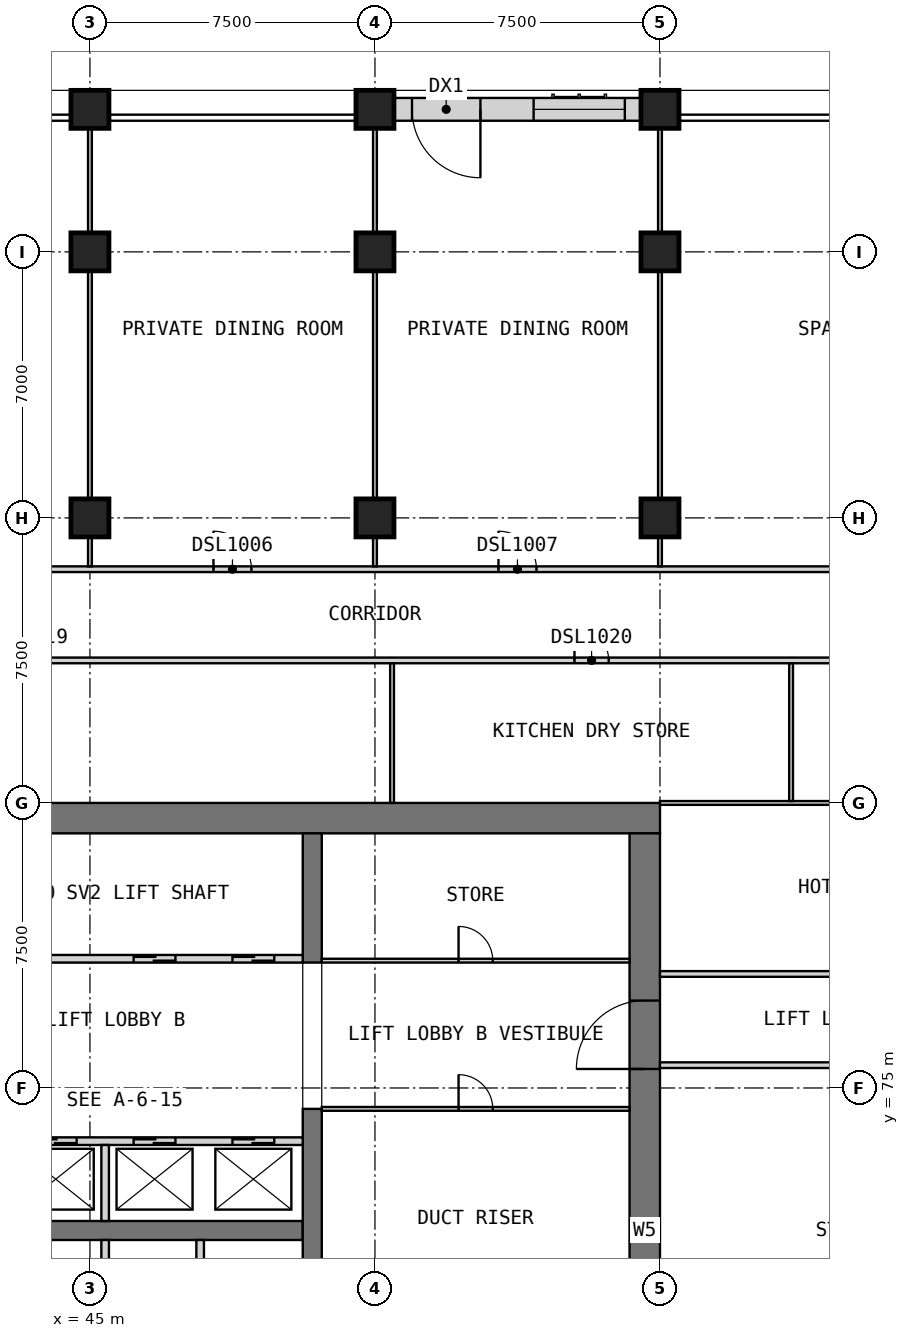
"""IFC4 building model, lengths in metres.
Left out: names, types, materials, properties, quantities, classifications, styles, units other than length and angle.
Written with IfcOpenShell. Run it as: python <this file> out.ifc"""

import sys

from ifc_helpers import new_model, si_unit, direction, frame, frame_2d, origin, origin_2d, place, context, subcontext, project, spatial, rectangle, extrude, element, fill, save


model = new_model("IFC4")
c1 = context("Model", 3, precision=1e-05, world=origin(), true_north=direction((0.0, 1.0)))
c2 = subcontext(c1, "Body", "Model", "MODEL_VIEW")
j1 = project(units=[si_unit("LENGTHUNIT", "METRE"), si_unit("PLANEANGLEUNIT", "RADIAN")], contexts=[c1])
p1 = place(None, origin())
s1 = spatial("IfcSite", under=j1, at=p1, CompositionType="ELEMENT")
p2 = place(p1, origin())
s2 = spatial("IfcBuilding", under=s1, at=p2, CompositionType="ELEMENT")
p3 = place(p2, frame((0.0, 0.0, 124.2)))
s3 = spatial("IfcBuildingStorey", under=s2, at=p3, CompositionType="ELEMENT", Elevation=124.2)
for number, where, z_axis, x_axis in (
    (1, (45.0, 100.75, 0.0), (0.0, 0.0, 1.0), (1.0, 0.0, 0.0)),
    (2, (52.5, 100.75, 0.0), (0.0, 0.0, 1.0), (1.0, 0.0, 0.0)),
    (3, (60.0, 100.75, 0.0), (0.0, 0.0, 1.0), (1.0, 0.0, 0.0)),
    (4, (45.0, 90.0, 0.0), (0.0, 0.0, 1.0), (1.0, 0.0, 0.0)),
    (5, (45.0, 97.0, 0.0), (0.0, 0.0, 1.0), (1.0, 0.0, 0.0)),
    (6, (52.5, 90.0, 0.0), (0.0, 0.0, 1.0), (1.0, 0.0, 0.0)),
    (7, (52.5, 97.0, 0.0), (0.0, 0.0, 1.0), (1.0, 0.0, 0.0)),
    (8, (60.0, 90.0, 0.0), (0.0, 0.0, 1.0), (1.0, 0.0, 0.0)),
    (9, (60.0, 97.0, 0.0), (0.0, 0.0, 1.0), (1.0, 0.0, 0.0)),
):
    element("IfcColumn", number, at=place(p3, frame(where, z_axis=z_axis, x_axis=x_axis)), inside=s3, PredefinedType="COLUMN", context=c2, shape_type="SweptSolid", body=[
        extrude(rectangle(XDim=1.0, YDim=1.0, at=origin_2d()), origin(), (0.0, 0.0, 1.0), 6.0),
    ])
p4 = place(p3, frame((30.0, 82.1, 0.0), z_axis=(0.0, 0.0, 1.0), x_axis=(1.0, 0.0, 0.0)))
e10 = element("IfcWall", 10, at=p4, inside=s3, PredefinedType="SHEAR", context=c2, shape_type="SweptSolid", body=[
    extrude(rectangle(XDim=30.0, YDim=0.8, at=frame_2d((15.0, 0.0))), origin(), (0.0, 0.0, 1.0), 6.0),
])
p5 = place(p3, frame((59.6, 60.8, 0.0), z_axis=(0.0, 0.0, 1.0), x_axis=(0.0, 1.0, 0.0)))
e11 = element("IfcWall", 11, at=p5, inside=s3, PredefinedType="SHEAR", context=c2, shape_type="SweptSolid", body=[
    extrude(rectangle(XDim=20.9, YDim=0.8, at=frame_2d((10.45, 0.0))), origin(), (0.0, 0.0, 1.0), 6.0),
])
p6 = place(p5, frame((14.7, 0.0, 0.0)))
e12 = element("IfcOpeningElement", 12, at=p6, cuts=e11, PredefinedType="OPENING", context=c2, shape_type="SweptSolid", body=[
    extrude(rectangle(XDim=1.8, YDim=2.1, at=frame_2d((0.9, 1.05))), frame((0.0, 0.41, 0.0), z_axis=(0.0, -1.0, 0.0), x_axis=(1.0, 0.0, 0.0)), (0.0, 0.0, 1.0), 0.82),
])
p7 = place(p3, frame((35.0, 71.25, 0.0), z_axis=(0.0, 0.0, 1.0), x_axis=(1.0, 0.0, 0.0)))
e13 = element("IfcWall", 13, at=p7, inside=s3, PredefinedType="SHEAR", context=c2, shape_type="SweptSolid", body=[
    extrude(rectangle(XDim=15.6, YDim=0.5, at=frame_2d((7.8, 0.0))), origin(), (0.0, 0.0, 1.0), 6.0),
])
p8 = place(p3, frame((50.85, 68.05, 0.0), z_axis=(0.0, 0.0, 1.0), x_axis=(0.0, 1.0, 0.0)))
e14 = element("IfcWall", 14, at=p8, inside=s3, PredefinedType="SHEAR", context=c2, shape_type="SweptSolid", body=[
    extrude(rectangle(XDim=6.4, YDim=0.5, at=frame_2d((3.2, 0.0))), origin(), (0.0, 0.0, 1.0), 6.0),
])
p9 = place(p3, frame((50.85, 78.3, 0.0), z_axis=(0.0, 0.0, 1.0), x_axis=(0.0, 1.0, 0.0)))
e15 = element("IfcWall", 15, at=p9, inside=s3, PredefinedType="SHEAR", context=c2, shape_type="SweptSolid", body=[
    extrude(rectangle(XDim=3.4, YDim=0.5, at=frame_2d((1.7, 0.0))), origin(), (0.0, 0.0, 1.0), 6.0),
])
p10 = place(p3, frame((59.5, 100.75, 0.0), z_axis=(0.0, 0.0, 1.0), x_axis=(-1.0, 0.0, 0.0)))
e16 = element("IfcWall", 16, at=p10, inside=s3, PredefinedType="SOLIDWALL", context=c2, shape_type="SweptSolid", body=[
    extrude(rectangle(XDim=6.5, YDim=0.6, at=frame_2d((3.25, 0.0))), origin(), (0.0, 0.0, 1.0), 5.25),
])
p11 = place(p10, frame((4.225, 0.0, 0.0)))
e17 = element("IfcOpeningElement", 17, at=p11, cuts=e16, PredefinedType="OPENING", context=c2, shape_type="SweptSolid", body=[
    extrude(rectangle(XDim=1.8, YDim=2.4, at=frame_2d((0.9, 1.2))), frame((0.0, 0.31, 0.0), z_axis=(0.0, -1.0, 0.0), x_axis=(1.0, 0.0, 0.0)), (0.0, 0.0, 1.0), 0.62),
])
p12 = place(p10, frame((0.425, 0.0, 0.8)))
e18 = element("IfcOpeningElement", 18, at=p12, cuts=e16, PredefinedType="OPENING", context=c2, shape_type="SweptSolid", body=[
    extrude(rectangle(XDim=2.4, YDim=1.8, at=frame_2d((1.2, 0.9))), frame((0.0, 0.31, 0.0), z_axis=(0.0, -1.0, 0.0), x_axis=(1.0, 0.0, 0.0)), (0.0, 0.0, 1.0), 0.62),
])
for number, where, z_axis, x_axis in (
    (19, (45.4, 68.25, 0.0), (0.0, 0.0, 1.0), (0.0, 1.0, 0.0)),
    (20, (47.9, 68.25, 0.0), (0.0, 0.0, 1.0), (0.0, 1.0, 0.0)),
):
    element("IfcWall", number, at=place(p3, frame(where, z_axis=z_axis, x_axis=x_axis)), inside=s3, PredefinedType="SOLIDWALL", context=c2, shape_type="SweptSolid", body=[
        extrude(rectangle(XDim=2.75, YDim=0.2, at=frame_2d((1.375, 0.0))), origin(), (0.0, 0.0, 1.0), 6.0),
    ])
p13 = place(p3, frame((35.0, 73.6, 0.0), z_axis=(0.0, 0.0, 1.0), x_axis=(1.0, 0.0, 0.0)))
e21 = element("IfcWall", 21, at=p13, inside=s3, PredefinedType="SOLIDWALL", context=c2, shape_type="SweptSolid", body=[
    extrude(rectangle(XDim=15.6, YDim=0.2, at=frame_2d((7.8, 0.0))), origin(), (0.0, 0.0, 1.0), 6.0),
])
p14 = place(p13, frame((0.75, 0.0, 0.0)))
e22 = element("IfcOpeningElement", 22, at=p14, cuts=e21, PredefinedType="OPENING", context=c2, shape_type="SweptSolid", body=[
    extrude(rectangle(XDim=1.1, YDim=2.1, at=frame_2d((0.55, 1.05))), frame((0.0, 0.11, 0.0), z_axis=(0.0, -1.0, 0.0), x_axis=(1.0, 0.0, 0.0)), (0.0, 0.0, 1.0), 0.22),
])
p15 = place(p13, frame((3.35, 0.0, 0.0)))
e23 = element("IfcOpeningElement", 23, at=p15, cuts=e21, PredefinedType="OPENING", context=c2, shape_type="SweptSolid", body=[
    extrude(rectangle(XDim=1.1, YDim=2.1, at=frame_2d((0.55, 1.05))), frame((0.0, 0.11, 0.0), z_axis=(0.0, -1.0, 0.0), x_axis=(1.0, 0.0, 0.0)), (0.0, 0.0, 1.0), 0.22),
])
p16 = place(p13, frame((5.95, 0.0, 0.0)))
e24 = element("IfcOpeningElement", 24, at=p16, cuts=e21, PredefinedType="OPENING", context=c2, shape_type="SweptSolid", body=[
    extrude(rectangle(XDim=1.1, YDim=2.1, at=frame_2d((0.55, 1.05))), frame((0.0, 0.11, 0.0), z_axis=(0.0, -1.0, 0.0), x_axis=(1.0, 0.0, 0.0)), (0.0, 0.0, 1.0), 0.22),
])
p17 = place(p13, frame((8.55, 0.0, 0.0)))
e25 = element("IfcOpeningElement", 25, at=p17, cuts=e21, PredefinedType="OPENING", context=c2, shape_type="SweptSolid", body=[
    extrude(rectangle(XDim=1.1, YDim=2.1, at=frame_2d((0.55, 1.05))), frame((0.0, 0.11, 0.0), z_axis=(0.0, -1.0, 0.0), x_axis=(1.0, 0.0, 0.0)), (0.0, 0.0, 1.0), 0.22),
])
p18 = place(p13, frame((11.15, 0.0, 0.0)))
e26 = element("IfcOpeningElement", 26, at=p18, cuts=e21, PredefinedType="OPENING", context=c2, shape_type="SweptSolid", body=[
    extrude(rectangle(XDim=1.1, YDim=2.1, at=frame_2d((0.55, 1.05))), frame((0.0, 0.11, 0.0), z_axis=(0.0, -1.0, 0.0), x_axis=(1.0, 0.0, 0.0)), (0.0, 0.0, 1.0), 0.22),
])
p19 = place(p13, frame((13.75, 0.0, 0.0)))
e27 = element("IfcOpeningElement", 27, at=p19, cuts=e21, PredefinedType="OPENING", context=c2, shape_type="SweptSolid", body=[
    extrude(rectangle(XDim=1.1, YDim=2.1, at=frame_2d((0.55, 1.05))), frame((0.0, 0.11, 0.0), z_axis=(0.0, -1.0, 0.0), x_axis=(1.0, 0.0, 0.0)), (0.0, 0.0, 1.0), 0.22),
])
p20 = place(p3, frame((45.4, 71.5, 0.0), z_axis=(0.0, 0.0, 1.0), x_axis=(0.0, 1.0, 0.0)))
e28 = element("IfcWall", 28, at=p20, inside=s3, PredefinedType="SOLIDWALL", context=c2, shape_type="SweptSolid", body=[
    extrude(rectangle(XDim=2.0, YDim=0.2, at=frame_2d((1.0, 0.0))), origin(), (0.0, 0.0, 1.0), 6.0),
])
p21 = place(p3, frame((35.0, 78.4, 0.0), z_axis=(0.0, 0.0, 1.0), x_axis=(1.0, 0.0, 0.0)))
e29 = element("IfcWall", 29, at=p21, inside=s3, PredefinedType="SOLIDWALL", context=c2, shape_type="SweptSolid", body=[
    extrude(rectangle(XDim=15.6, YDim=0.2, at=frame_2d((7.8, 0.0))), origin(), (0.0, 0.0, 1.0), 6.0),
])
p22 = place(p21, frame((0.75, 0.0, 0.0)))
e30 = element("IfcOpeningElement", 30, at=p22, cuts=e29, PredefinedType="OPENING", context=c2, shape_type="SweptSolid", body=[
    extrude(rectangle(XDim=1.1, YDim=2.1, at=frame_2d((0.55, 1.05))), frame((0.0, 0.11, 0.0), z_axis=(0.0, -1.0, 0.0), x_axis=(1.0, 0.0, 0.0)), (0.0, 0.0, 1.0), 0.22),
])
p23 = place(p21, frame((3.35, 0.0, 0.0)))
e31 = element("IfcOpeningElement", 31, at=p23, cuts=e29, PredefinedType="OPENING", context=c2, shape_type="SweptSolid", body=[
    extrude(rectangle(XDim=1.1, YDim=2.1, at=frame_2d((0.55, 1.05))), frame((0.0, 0.11, 0.0), z_axis=(0.0, -1.0, 0.0), x_axis=(1.0, 0.0, 0.0)), (0.0, 0.0, 1.0), 0.22),
])
p24 = place(p21, frame((11.15, 0.0, 0.0)))
e32 = element("IfcOpeningElement", 32, at=p24, cuts=e29, PredefinedType="OPENING", context=c2, shape_type="SweptSolid", body=[
    extrude(rectangle(XDim=1.1, YDim=2.1, at=frame_2d((0.55, 1.05))), frame((0.0, 0.11, 0.0), z_axis=(0.0, -1.0, 0.0), x_axis=(1.0, 0.0, 0.0)), (0.0, 0.0, 1.0), 0.22),
])
p25 = place(p21, frame((13.75, 0.0, 0.0)))
e33 = element("IfcOpeningElement", 33, at=p25, cuts=e29, PredefinedType="OPENING", context=c2, shape_type="SweptSolid", body=[
    extrude(rectangle(XDim=1.1, YDim=2.1, at=frame_2d((0.55, 1.05))), frame((0.0, 0.11, 0.0), z_axis=(0.0, -1.0, 0.0), x_axis=(1.0, 0.0, 0.0)), (0.0, 0.0, 1.0), 0.22),
])
p26 = place(p3, frame((51.1, 74.45, 0.0), z_axis=(0.0, 0.0, 1.0), x_axis=(1.0, 0.0, 0.0)))
e34 = element("IfcWall", 34, at=p26, inside=s3, PredefinedType="PARTITIONING", context=c2, shape_type="SweptSolid", body=[
    extrude(rectangle(XDim=8.1, YDim=0.1, at=frame_2d((4.05, 0.0))), origin(), (0.0, 0.0, 1.0), 5.75),
])
p27 = place(p26, frame((3.6, 0.0, 0.0)))
e35 = element("IfcOpeningElement", 35, at=p27, cuts=e34, PredefinedType="OPENING", context=c2, shape_type="SweptSolid", body=[
    extrude(rectangle(XDim=0.9, YDim=2.1, at=frame_2d((0.45, 1.05))), frame((0.0, 0.06, 0.0), z_axis=(0.0, -1.0, 0.0), x_axis=(1.0, 0.0, 0.0)), (0.0, 0.0, 1.0), 0.12),
])
p28 = place(p3, frame((51.1, 78.35, 0.0), z_axis=(0.0, 0.0, 1.0), x_axis=(1.0, 0.0, 0.0)))
e36 = element("IfcWall", 36, at=p28, inside=s3, PredefinedType="PARTITIONING", context=c2, shape_type="SweptSolid", body=[
    extrude(rectangle(XDim=8.1, YDim=0.1, at=frame_2d((4.05, 0.0))), origin(), (0.0, 0.0, 1.0), 5.75),
])
p29 = place(p28, frame((3.6, 0.0, 0.0)))
e37 = element("IfcOpeningElement", 37, at=p29, cuts=e36, PredefinedType="OPENING", context=c2, shape_type="SweptSolid", body=[
    extrude(rectangle(XDim=0.9, YDim=2.1, at=frame_2d((0.45, 1.05))), frame((0.0, 0.06, 0.0), z_axis=(0.0, -1.0, 0.0), x_axis=(1.0, 0.0, 0.0)), (0.0, 0.0, 1.0), 0.12),
])
p30 = place(p3, frame((33.75, 86.25, 0.0), z_axis=(0.0, 0.0, 1.0), x_axis=(1.0, 0.0, 0.0)))
e38 = element("IfcWall", 38, at=p30, inside=s3, PredefinedType="PARTITIONING", context=c2, shape_type="SweptSolid", body=[
    extrude(rectangle(XDim=37.5, YDim=0.15, at=frame_2d((18.75, 0.0))), origin(), (0.0, 0.0, 1.0), 5.75),
])
p31 = place(p30, frame((9.15, 0.0, 0.0)))
e39 = element("IfcOpeningElement", 39, at=p31, cuts=e38, PredefinedType="OPENING", context=c2, shape_type="SweptSolid", body=[
    extrude(rectangle(XDim=0.9, YDim=2.1, at=frame_2d((0.45, 1.05))), frame((0.0, 0.085, 0.0), z_axis=(0.0, -1.0, 0.0), x_axis=(1.0, 0.0, 0.0)), (0.0, 0.0, 1.0), 0.17),
])
p32 = place(p30, frame((24.0, 0.0, 0.0)))
e40 = element("IfcOpeningElement", 40, at=p32, cuts=e38, PredefinedType="OPENING", context=c2, shape_type="SweptSolid", body=[
    extrude(rectangle(XDim=0.9, YDim=2.1, at=frame_2d((0.45, 1.05))), frame((0.0, 0.085, 0.0), z_axis=(0.0, -1.0, 0.0), x_axis=(1.0, 0.0, 0.0)), (0.0, 0.0, 1.0), 0.17),
])
p33 = place(p3, frame((33.75, 88.65, 0.0), z_axis=(0.0, 0.0, 1.0), x_axis=(1.0, 0.0, 0.0)))
e41 = element("IfcWall", 41, at=p33, inside=s3, PredefinedType="PARTITIONING", context=c2, shape_type="SweptSolid", body=[
    extrude(rectangle(XDim=39.9, YDim=0.15, at=frame_2d((19.95, 0.0))), origin(), (0.0, 0.0, 1.0), 5.75),
])
p34 = place(p33, frame((4.725, 0.0, 0.0)))
e42 = element("IfcOpeningElement", 42, at=p34, cuts=e41, PredefinedType="OPENING", context=c2, shape_type="SweptSolid", body=[
    extrude(rectangle(XDim=1.8, YDim=2.1, at=frame_2d((0.9, 1.05))), frame((0.0, 0.085, 0.0), z_axis=(0.0, -1.0, 0.0), x_axis=(1.0, 0.0, 0.0)), (0.0, 0.0, 1.0), 0.17),
])
p35 = place(p33, frame((14.5, 0.0, 0.0)))
e43 = element("IfcOpeningElement", 43, at=p35, cuts=e41, PredefinedType="OPENING", context=c2, shape_type="SweptSolid", body=[
    extrude(rectangle(XDim=1.0, YDim=2.1, at=frame_2d((0.5, 1.05))), frame((0.0, 0.085, 0.0), z_axis=(0.0, -1.0, 0.0), x_axis=(1.0, 0.0, 0.0)), (0.0, 0.0, 1.0), 0.17),
])
p36 = place(p33, frame((22.0, 0.0, 0.0)))
e44 = element("IfcOpeningElement", 44, at=p36, cuts=e41, PredefinedType="OPENING", context=c2, shape_type="SweptSolid", body=[
    extrude(rectangle(XDim=1.0, YDim=2.1, at=frame_2d((0.5, 1.05))), frame((0.0, 0.085, 0.0), z_axis=(0.0, -1.0, 0.0), x_axis=(1.0, 0.0, 0.0)), (0.0, 0.0, 1.0), 0.17),
])
p37 = place(p33, frame((31.375, 0.0, 0.0)))
e45 = element("IfcOpeningElement", 45, at=p37, cuts=e41, PredefinedType="OPENING", context=c2, shape_type="SweptSolid", body=[
    extrude(rectangle(XDim=1.0, YDim=2.1, at=frame_2d((0.5, 1.05))), frame((0.0, 0.085, 0.0), z_axis=(0.0, -1.0, 0.0), x_axis=(1.0, 0.0, 0.0)), (0.0, 0.0, 1.0), 0.17),
])
p38 = place(p3, frame((60.0, 82.5, 0.0), z_axis=(0.0, 0.0, 1.0), x_axis=(1.0, 0.0, 0.0)))
e46 = element("IfcWall", 46, at=p38, inside=s3, PredefinedType="PARTITIONING", context=c2, shape_type="SweptSolid", body=[
    extrude(rectangle(XDim=11.175, YDim=0.1, at=frame_2d((5.587, 0.0))), origin(), (0.0, 0.0, 1.0), 5.75),
])
for number, where, z_axis, x_axis in (
    (47, (45.0, 88.725, 0.0), (0.0, 0.0, 1.0), (0.0, 1.0, 0.0)),
    (48, (52.5, 88.725, 0.0), (0.0, 0.0, 1.0), (0.0, 1.0, 0.0)),
):
    element("IfcWall", number, at=place(p3, frame(where, z_axis=z_axis, x_axis=x_axis)), inside=s3, PredefinedType="PARTITIONING", context=c2, shape_type="SweptSolid", body=[
        extrude(rectangle(XDim=12.525, YDim=0.1, at=frame_2d((6.262, 0.0))), origin(), (0.0, 0.0, 1.0), 5.75),
    ])
p39 = place(p3, frame((52.95, 82.5, 0.0), z_axis=(0.0, 0.0, 1.0), x_axis=(0.0, 1.0, 0.0)))
e49 = element("IfcWall", 49, at=p39, inside=s3, PredefinedType="PARTITIONING", context=c2, shape_type="SweptSolid", body=[
    extrude(rectangle(XDim=3.675, YDim=0.1, at=frame_2d((1.837, 0.0))), origin(), (0.0, 0.0, 1.0), 5.75),
])
p40 = place(p3, frame((60.0, 88.725, 0.0), z_axis=(0.0, 0.0, 1.0), x_axis=(0.0, 1.0, 0.0)))
e50 = element("IfcWall", 50, at=p40, inside=s3, PredefinedType="PARTITIONING", context=c2, shape_type="SweptSolid", body=[
    extrude(rectangle(XDim=12.525, YDim=0.1, at=frame_2d((6.262, 0.0))), origin(), (0.0, 0.0, 1.0), 5.75),
])
p41 = place(p3, frame((63.45, 82.55, 0.0), z_axis=(0.0, 0.0, 1.0), x_axis=(0.0, 1.0, 0.0)))
e51 = element("IfcWall", 51, at=p41, inside=s3, PredefinedType="PARTITIONING", context=c2, shape_type="SweptSolid", body=[
    extrude(rectangle(XDim=3.625, YDim=0.1, at=frame_2d((1.812, 0.0))), origin(), (0.0, 0.0, 1.0), 5.75),
])
for number, where, z_axis, x_axis in (
    (52, (60.0, 75.6, 0.0), (0.0, 0.0, 1.0), (1.0, 0.0, 0.0)),
    (53, (60.0, 78.0, 0.0), (0.0, 0.0, 1.0), (1.0, 0.0, 0.0)),
):
    element("IfcWall", number, at=place(p3, frame(where, z_axis=z_axis, x_axis=x_axis)), inside=s3, PredefinedType="PARTITIONING", context=c2, shape_type="SweptSolid", body=[
        extrude(rectangle(XDim=11.25, YDim=0.15, at=frame_2d((5.625, 0.0))), origin(), (0.0, 0.0, 1.0), 5.75),
    ])
p42 = place(p11, origin())
e54 = element("IfcDoor", 54, at=p42, inside=s3, OperationType="SINGLE_SWING_LEFT", PredefinedType="DOOR", context=c2, shape_type="SweptSolid", body=[
    extrude(rectangle(XDim=1.8, YDim=2.4, at=frame_2d((0.9, 1.2))), frame((0.0, -0.075, 0.0), z_axis=(0.0, -1.0, 0.0), x_axis=(1.0, 0.0, 0.0)), (0.0, 0.0, 1.0), 0.05),
])
fill(e17, e54)
p43 = place(p12, origin())
e55 = element("IfcWindow", 55, at=p43, inside=s3, PartitioningType="SINGLE_PANEL", PredefinedType="WINDOW", context=c2, shape_type="SweptSolid", body=[
    extrude(rectangle(XDim=2.4, YDim=1.8, at=frame_2d((1.2, 0.9))), frame((0.0, -0.07, 0.0), z_axis=(0.0, -1.0, 0.0), x_axis=(1.0, 0.0, 0.0)), (0.0, 0.0, 1.0), 0.06),
])
fill(e18, e55)
p44 = place(p17, origin())
e56 = element("IfcDoor", 56, at=p44, inside=s3, OperationType="DOUBLE_DOOR_SLIDING", PredefinedType="DOOR", context=c2, shape_type="SweptSolid", body=[
    extrude(rectangle(XDim=1.1, YDim=2.1, at=frame_2d((0.55, 1.05))), frame((0.0, 0.025, 0.0), z_axis=(0.0, -1.0, 0.0), x_axis=(1.0, 0.0, 0.0)), (0.0, 0.0, 1.0), 0.05),
])
fill(e25, e56)
p45 = place(p18, origin())
e57 = element("IfcDoor", 57, at=p45, inside=s3, OperationType="DOUBLE_DOOR_SLIDING", PredefinedType="DOOR", context=c2, shape_type="SweptSolid", body=[
    extrude(rectangle(XDim=1.1, YDim=2.1, at=frame_2d((0.55, 1.05))), frame((0.0, 0.025, 0.0), z_axis=(0.0, -1.0, 0.0), x_axis=(1.0, 0.0, 0.0)), (0.0, 0.0, 1.0), 0.05),
])
fill(e26, e57)
p46 = place(p19, origin())
e58 = element("IfcDoor", 58, at=p46, inside=s3, OperationType="DOUBLE_DOOR_SLIDING", PredefinedType="DOOR", context=c2, shape_type="SweptSolid", body=[
    extrude(rectangle(XDim=1.1, YDim=2.1, at=frame_2d((0.55, 1.05))), frame((0.0, 0.025, 0.0), z_axis=(0.0, -1.0, 0.0), x_axis=(1.0, 0.0, 0.0)), (0.0, 0.0, 1.0), 0.05),
])
fill(e27, e58)
p47 = place(p24, origin())
e59 = element("IfcDoor", 59, at=p47, inside=s3, OperationType="DOUBLE_DOOR_SLIDING", PredefinedType="DOOR", context=c2, shape_type="SweptSolid", body=[
    extrude(rectangle(XDim=1.1, YDim=2.1, at=frame_2d((0.55, 1.05))), frame((0.0, 0.025, 0.0), z_axis=(0.0, -1.0, 0.0), x_axis=(1.0, 0.0, 0.0)), (0.0, 0.0, 1.0), 0.05),
])
fill(e32, e59)
p48 = place(p25, origin())
e60 = element("IfcDoor", 60, at=p48, inside=s3, OperationType="DOUBLE_DOOR_SLIDING", PredefinedType="DOOR", context=c2, shape_type="SweptSolid", body=[
    extrude(rectangle(XDim=1.1, YDim=2.1, at=frame_2d((0.55, 1.05))), frame((0.0, 0.025, 0.0), z_axis=(0.0, -1.0, 0.0), x_axis=(1.0, 0.0, 0.0)), (0.0, 0.0, 1.0), 0.05),
])
fill(e33, e60)
p49 = place(p6, origin())
e61 = element("IfcDoor", 61, at=p49, inside=s3, OperationType="DOUBLE_DOOR_SINGLE_SWING", PredefinedType="DOOR", context=c2, shape_type="SweptSolid", body=[
    extrude(rectangle(XDim=1.8, YDim=2.1, at=frame_2d((0.9, 1.05))), frame((0.0, 0.025, 0.0), z_axis=(0.0, -1.0, 0.0), x_axis=(1.0, 0.0, 0.0)), (0.0, 0.0, 1.0), 0.05),
])
fill(e12, e61)
p50 = place(p27, origin())
e62 = element("IfcDoor", 62, at=p50, inside=s3, OperationType="SINGLE_SWING_RIGHT", PredefinedType="DOOR", context=c2, shape_type="SweptSolid", body=[
    extrude(rectangle(XDim=0.9, YDim=2.1, at=frame_2d((0.45, 1.05))), frame((0.0, 0.025, 0.0), z_axis=(0.0, -1.0, 0.0), x_axis=(1.0, 0.0, 0.0)), (0.0, 0.0, 1.0), 0.05),
])
fill(e35, e62)
p51 = place(p29, origin())
e63 = element("IfcDoor", 63, at=p51, inside=s3, OperationType="SINGLE_SWING_RIGHT", PredefinedType="DOOR", context=c2, shape_type="SweptSolid", body=[
    extrude(rectangle(XDim=0.9, YDim=2.1, at=frame_2d((0.45, 1.05))), frame((0.0, 0.025, 0.0), z_axis=(0.0, -1.0, 0.0), x_axis=(1.0, 0.0, 0.0)), (0.0, 0.0, 1.0), 0.05),
])
fill(e37, e63)
p52 = place(p35, origin())
e64 = element("IfcDoor", 64, at=p52, inside=s3, OperationType="SINGLE_SWING_LEFT", PredefinedType="DOOR", context=c2, shape_type="SweptSolid", body=[
    extrude(rectangle(XDim=1.0, YDim=2.1, at=frame_2d((0.5, 1.05))), frame((0.0, 0.025, 0.0), z_axis=(0.0, -1.0, 0.0), x_axis=(1.0, 0.0, 0.0)), (0.0, 0.0, 1.0), 0.05),
])
fill(e43, e64)
p53 = place(p36, origin())
e65 = element("IfcDoor", 65, at=p53, inside=s3, OperationType="SINGLE_SWING_LEFT", PredefinedType="DOOR", context=c2, shape_type="SweptSolid", body=[
    extrude(rectangle(XDim=1.0, YDim=2.1, at=frame_2d((0.5, 1.05))), frame((0.0, 0.025, 0.0), z_axis=(0.0, -1.0, 0.0), x_axis=(1.0, 0.0, 0.0)), (0.0, 0.0, 1.0), 0.05),
])
fill(e44, e65)
p54 = place(p32, origin())
e66 = element("IfcDoor", 66, at=p54, inside=s3, OperationType="SINGLE_SWING_LEFT", PredefinedType="DOOR", context=c2, shape_type="SweptSolid", body=[
    extrude(rectangle(XDim=0.9, YDim=2.1, at=frame_2d((0.45, 1.05))), frame((0.0, 0.025, 0.0), z_axis=(0.0, -1.0, 0.0), x_axis=(1.0, 0.0, 0.0)), (0.0, 0.0, 1.0), 0.05),
])
fill(e40, e66)
save(model, sys.argv[1])
